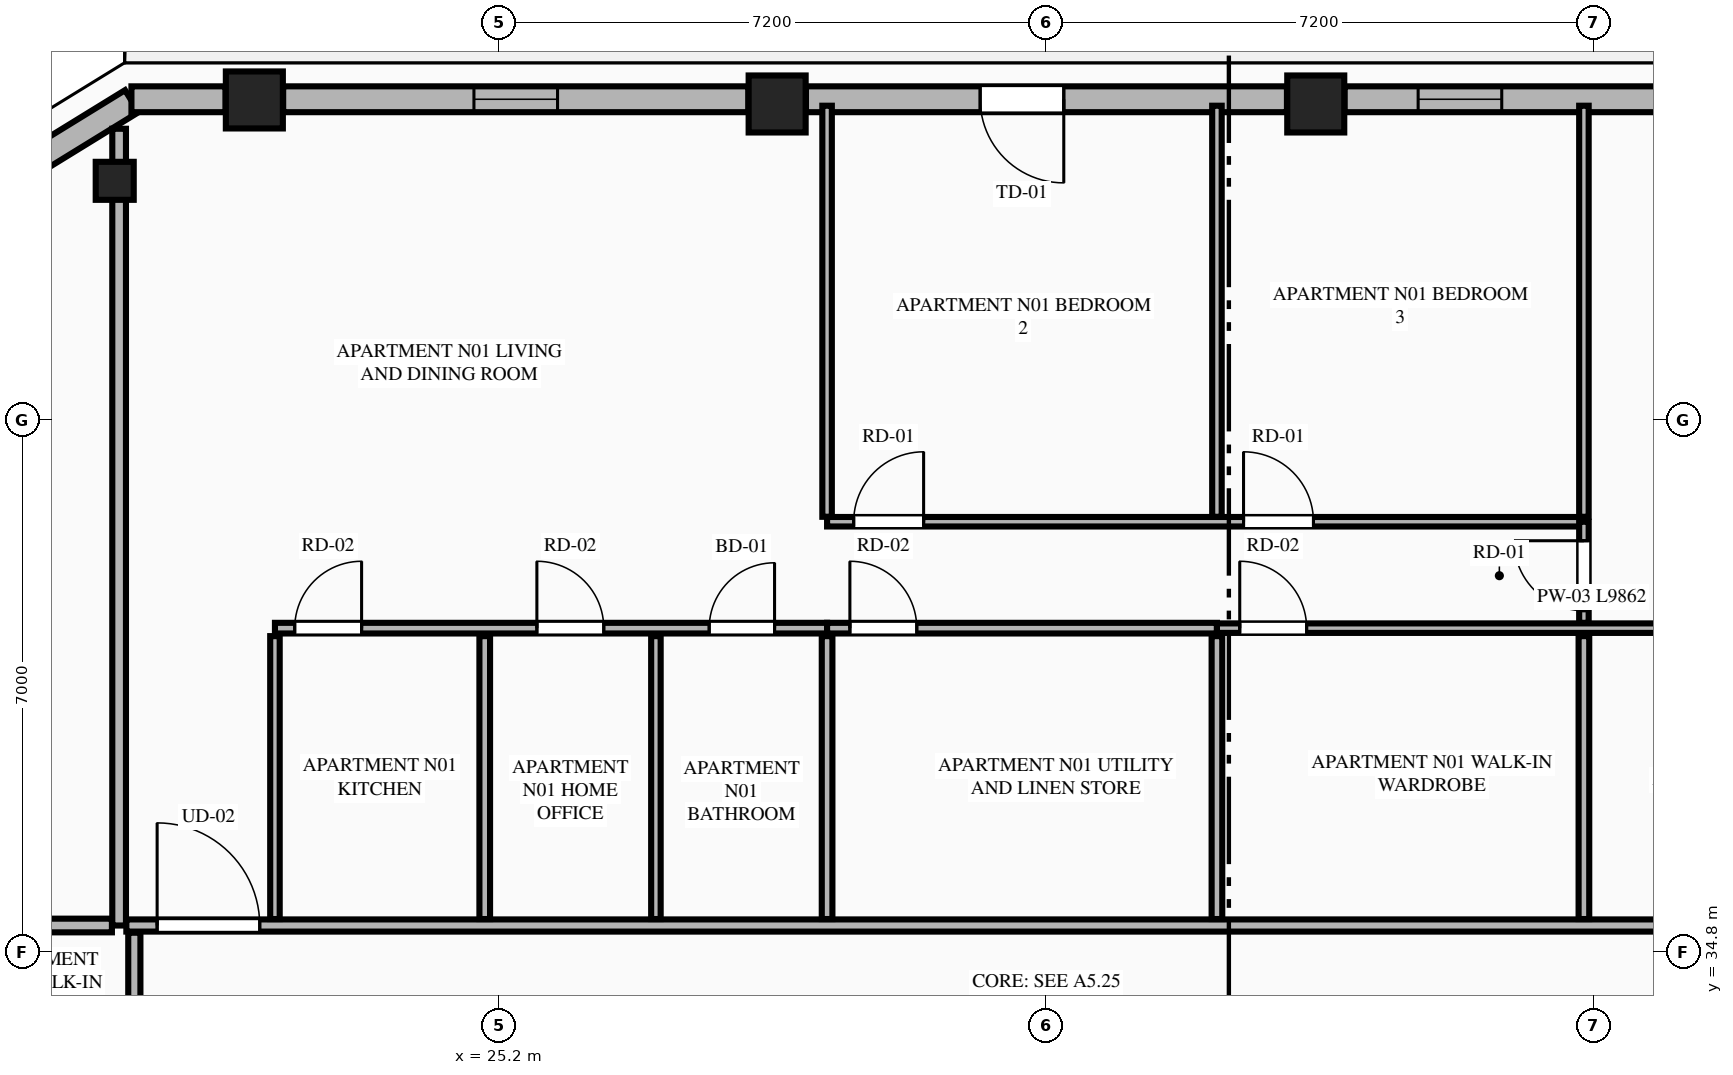
"""IFC4 building model, lengths in metres.
Left out: names, types, materials, properties, quantities, classifications, styles, units other than length and angle.
Written with IfcOpenShell. Run it as: python <this file> out.ifc"""

import sys

from ifc_helpers import new_model, si_unit, direction, frame, frame_2d, origin, origin_2d, place, context, subcontext, project, spatial, rectangle, extrude, element, fill, save


model = new_model("IFC4")
c1 = context("Model", 3, precision=1e-05, world=origin(), true_north=direction((0.0, 1.0)))
c2 = subcontext(c1, "Body", "Model", "MODEL_VIEW")
j1 = project(units=[si_unit("LENGTHUNIT", "METRE"), si_unit("PLANEANGLEUNIT", "RADIAN")], contexts=[c1])
p1 = place(None, origin())
s1 = spatial("IfcSite", under=j1, at=p1, CompositionType="ELEMENT")
p2 = place(p1, origin())
s2 = spatial("IfcBuilding", under=s1, at=p2, CompositionType="ELEMENT")
p3 = place(p2, frame((0.0, 0.0, 207.4)))
s3 = spatial("IfcBuildingStorey", under=s2, at=p3, CompositionType="ELEMENT", Elevation=207.4)
for number, where, z_axis, x_axis in (
    (1, (35.943, 45.958, 0.0), (0.0, 0.0, 1.0), (1.0, 0.0, 0.0)),
    (2, (28.857, 45.958, 0.0), (0.0, 0.0, 1.0), (1.0, 0.0, 0.0)),
    (3, (21.979, 46.011, 0.0), (0.0, 0.0, 1.0), (1.0, 0.0, 0.0)),
):
    element("IfcColumn", number, at=place(p3, frame(where, z_axis=z_axis, x_axis=x_axis)), inside=s3, PredefinedType="COLUMN", context=c2, shape_type="SweptSolid", body=[
        extrude(rectangle(XDim=0.75, YDim=0.75, at=origin_2d()), origin(), (0.0, 0.0, 1.0), 3.55),
    ])
p4 = place(p3, frame((20.142, 44.947, 0.0), z_axis=(0.0, 0.0, 1.0), x_axis=(-0.865230187018, -0.501374833306, 0.0)))
e4 = element("IfcColumn", 4, at=p4, inside=s3, PredefinedType="PILASTER", context=c2, shape_type="SweptSolid", body=[
    extrude(rectangle(XDim=0.5, YDim=0.35, at=origin_2d()), origin(), (0.0, 0.0, 1.0), 3.55),
])
p5 = place(p3, frame((20.367, 45.995, 0.0), z_axis=(0.0, 0.0, 1.0), x_axis=(-0.851713271379, -0.524008113828, 0.0)))
e5 = element("IfcWall", 5, at=p5, inside=s3, PredefinedType="STANDARD", context=c2, shape_type="SweptSolid", body=[
    extrude(rectangle(XDim=1.678, YDim=0.34, at=frame_2d((0.839, 0.0))), origin(), (0.0, 0.0, 1.0), 3.35),
])
p6 = place(p3, frame((42.442, 46.02, 0.0), z_axis=(0.0, 0.0, 1.0), x_axis=(-1.0, 0.0, 0.0)))
e6 = element("IfcWall", 6, at=p6, inside=s3, PredefinedType="STANDARD", context=c2, shape_type="SweptSolid", body=[
    extrude(rectangle(XDim=6.12, YDim=0.34, at=frame_2d((3.06, 0.0))), origin(), (0.0, 0.0, 1.0), 2.883),
])
p7 = place(p6, frame((0.879, 0.0, 0.75)))
e7 = element("IfcOpeningElement", 7, at=p7, cuts=e6, PredefinedType="OPENING", context=c2, shape_type="SweptSolid", body=[
    extrude(rectangle(XDim=1.1, YDim=1.983, at=frame_2d((0.55, 0.991))), frame((0.0, 0.18, 0.0), z_axis=(0.0, -1.0, 0.0), x_axis=(1.0, 0.0, 0.0)), (0.0, 0.0, 1.0), 0.36),
])
p8 = place(p6, frame((4.052, 0.0, 0.75)))
e8 = element("IfcOpeningElement", 8, at=p8, cuts=e6, PredefinedType="OPENING", context=c2, shape_type="SweptSolid", body=[
    extrude(rectangle(XDim=1.1, YDim=1.983, at=frame_2d((0.55, 0.991))), frame((0.0, 0.18, 0.0), z_axis=(0.0, -1.0, 0.0), x_axis=(1.0, 0.0, 0.0)), (0.0, 0.0, 1.0), 0.36),
])
p9 = place(p3, frame((35.564, 46.02, 0.0), z_axis=(0.0, 0.0, 1.0), x_axis=(-1.0, 0.0, 0.0)))
e9 = element("IfcWall", 9, at=p9, inside=s3, PredefinedType="STANDARD", context=c2, shape_type="SweptSolid", body=[
    extrude(rectangle(XDim=6.328, YDim=0.34, at=frame_2d((3.164, 0.0))), origin(), (0.0, 0.0, 1.0), 2.883),
])
p10 = place(p9, frame((2.936, 0.0, 0.0)))
e10 = element("IfcOpeningElement", 10, at=p10, cuts=e9, PredefinedType="OPENING", context=c2, shape_type="SweptSolid", body=[
    extrude(rectangle(XDim=1.1, YDim=2.25, at=frame_2d((0.55, 1.125))), frame((0.0, 0.18, 0.0), z_axis=(0.0, -1.0, 0.0), x_axis=(1.0, 0.0, 0.0)), (0.0, 0.0, 1.0), 0.36),
])
p11 = place(p3, frame((28.478, 46.02, 0.0), z_axis=(0.0, 0.0, 1.0), x_axis=(-1.0, 0.0, 0.0)))
e11 = element("IfcWall", 11, at=p11, inside=s3, PredefinedType="STANDARD", context=c2, shape_type="SweptSolid", body=[
    extrude(rectangle(XDim=6.12, YDim=0.34, at=frame_2d((3.06, 0.0))), origin(), (0.0, 0.0, 1.0), 2.883),
])
p12 = place(p11, frame((2.51, 0.0, 0.75)))
e12 = element("IfcOpeningElement", 12, at=p12, cuts=e11, PredefinedType="OPENING", context=c2, shape_type="SweptSolid", body=[
    extrude(rectangle(XDim=1.1, YDim=1.983, at=frame_2d((0.55, 0.991))), frame((0.0, 0.18, 0.0), z_axis=(0.0, -1.0, 0.0), x_axis=(1.0, 0.0, 0.0)), (0.0, 0.0, 1.0), 0.36),
])
p13 = place(p3, frame((21.6, 46.02, 0.0), z_axis=(0.0, 0.0, 1.0), x_axis=(-1.0, 0.0, 0.0)))
e13 = element("IfcWall", 13, at=p13, inside=s3, PredefinedType="STANDARD", context=c2, shape_type="SweptSolid", body=[
    extrude(rectangle(XDim=1.238, YDim=0.34, at=frame_2d((0.619, 0.0))), origin(), (0.0, 0.0, 1.0), 3.35),
])
p14 = place(p3, frame((20.2, 35.15, 0.0), z_axis=(0.0, 0.0, 1.0), x_axis=(0.0, 1.0, 0.0)))
e14 = element("IfcWall", 14, at=p14, inside=s3, PredefinedType="PARTITIONING", context=c2, shape_type="SweptSolid", body=[
    extrude(rectangle(XDim=10.482, YDim=0.18, at=frame_2d((5.241, 0.0))), origin(), (0.0, 0.0, 1.0), 3.35),
])
p15 = place(p3, frame((20.295, 35.15, 0.0), z_axis=(0.0, 0.0, 1.0), x_axis=(1.0, 0.0, 0.0)))
e15 = element("IfcWall", 15, at=p15, inside=s3, PredefinedType="PARTITIONING", context=c2, shape_type="SweptSolid", body=[
    extrude(rectangle(XDim=24.21, YDim=0.16, at=frame_2d((12.105, 0.0))), origin(), (0.0, 0.0, 1.0), 3.35),
])
p16 = place(p15, frame((0.405, 0.0, 0.0)))
e16 = element("IfcOpeningElement", 16, at=p16, cuts=e15, PredefinedType="OPENING", context=c2, shape_type="SweptSolid", body=[
    extrude(rectangle(XDim=1.35, YDim=2.35, at=frame_2d((0.675, 1.175))), frame((0.0, 0.09, 0.0), z_axis=(0.0, -1.0, 0.0), x_axis=(1.0, 0.0, 0.0)), (0.0, 0.0, 1.0), 0.18),
])
p17 = place(p3, frame((22.25, 35.235, 0.0), z_axis=(0.0, 0.0, 1.0), x_axis=(0.0, 1.0, 0.0)))
e17 = element("IfcWall", 17, at=p17, inside=s3, PredefinedType="PARTITIONING", context=c2, shape_type="SweptSolid", body=[
    extrude(rectangle(XDim=3.722, YDim=0.125, at=frame_2d((1.861, 0.0))), origin(), (0.0, 0.0, 1.0), 2.807),
])
p18 = place(p3, frame((22.25, 39.062, 0.0), z_axis=(0.0, 0.0, 1.0), x_axis=(1.0, 0.0, 0.0)))
e18 = element("IfcWall", 18, at=p18, inside=s3, PredefinedType="PLUMBINGWALL", context=c2, shape_type="SweptSolid", body=[
    extrude(rectangle(XDim=7.264, YDim=0.14, at=frame_2d((3.632, 0.0))), origin(), (0.0, 0.0, 1.0), 3.35),
])
p19 = place(p18, frame((5.713, 0.0, 0.0)))
e19 = element("IfcOpeningElement", 19, at=p19, cuts=e18, PredefinedType="OPENING", context=c2, shape_type="SweptSolid", body=[
    extrude(rectangle(XDim=0.86, YDim=2.1, at=frame_2d((0.43, 1.05))), frame((0.0, 0.08, 0.0), z_axis=(0.0, -1.0, 0.0), x_axis=(1.0, 0.0, 0.0)), (0.0, 0.0, 1.0), 0.16),
])
p20 = place(p18, frame((0.26, 0.0, 0.0)))
e20 = element("IfcOpeningElement", 20, at=p20, cuts=e18, PredefinedType="OPENING", context=c2, shape_type="SweptSolid", body=[
    extrude(rectangle(XDim=0.88, YDim=2.15, at=frame_2d((0.44, 1.075))), frame((0.0, 0.08, 0.0), z_axis=(0.0, -1.0, 0.0), x_axis=(1.0, 0.0, 0.0)), (0.0, 0.0, 1.0), 0.16),
])
p21 = place(p18, frame((3.446, 0.0, 0.0)))
e21 = element("IfcOpeningElement", 21, at=p21, cuts=e18, PredefinedType="OPENING", context=c2, shape_type="SweptSolid", body=[
    extrude(rectangle(XDim=0.88, YDim=2.15, at=frame_2d((0.44, 1.075))), frame((0.0, 0.08, 0.0), z_axis=(0.0, -1.0, 0.0), x_axis=(1.0, 0.0, 0.0)), (0.0, 0.0, 1.0), 0.16),
])
p22 = place(p3, frame((29.514, 39.062, 0.0), z_axis=(0.0, 0.0, 1.0), x_axis=(1.0, 0.0, 0.0)))
e22 = element("IfcWall", 22, at=p22, inside=s3, PredefinedType="PLUMBINGWALL", context=c2, shape_type="SweptSolid", body=[
    extrude(rectangle(XDim=5.129, YDim=0.14, at=frame_2d((2.564, 0.0))), origin(), (0.0, 0.0, 1.0), 3.35),
])
p23 = place(p22, frame((0.3, 0.0, 0.0)))
e23 = element("IfcOpeningElement", 23, at=p23, cuts=e22, PredefinedType="OPENING", context=c2, shape_type="SweptSolid", body=[
    extrude(rectangle(XDim=0.88, YDim=2.15, at=frame_2d((0.44, 1.075))), frame((0.0, 0.08, 0.0), z_axis=(0.0, -1.0, 0.0), x_axis=(1.0, 0.0, 0.0)), (0.0, 0.0, 1.0), 0.16),
])
p24 = place(p3, frame((34.643, 39.062, 0.0), z_axis=(0.0, 0.0, 1.0), x_axis=(1.0, 0.0, 0.0)))
e24 = element("IfcWall", 24, at=p24, inside=s3, PredefinedType="PARTITIONING", context=c2, shape_type="SweptSolid", body=[
    extrude(rectangle(XDim=9.862, YDim=0.125, at=frame_2d((4.931, 0.0))), origin(), (0.0, 0.0, 1.0), 3.35),
])
p25 = place(p24, frame((6.92, 0.0, 0.0)))
e25 = element("IfcOpeningElement", 25, at=p25, cuts=e24, PredefinedType="OPENING", context=c2, shape_type="SweptSolid", body=[
    extrude(rectangle(XDim=0.86, YDim=2.1, at=frame_2d((0.43, 1.05))), frame((0.0, 0.073, 0.0), z_axis=(0.0, -1.0, 0.0), x_axis=(1.0, 0.0, 0.0)), (0.0, 0.0, 1.0), 0.145),
])
p26 = place(p24, frame((0.3, 0.0, 0.0)))
e26 = element("IfcOpeningElement", 26, at=p26, cuts=e24, PredefinedType="OPENING", context=c2, shape_type="SweptSolid", body=[
    extrude(rectangle(XDim=0.88, YDim=2.15, at=frame_2d((0.44, 1.075))), frame((0.0, 0.073, 0.0), z_axis=(0.0, -1.0, 0.0), x_axis=(1.0, 0.0, 0.0)), (0.0, 0.0, 1.0), 0.145),
])
p27 = place(p3, frame((25.01, 35.235, 0.0), z_axis=(0.0, 0.0, 1.0), x_axis=(0.0, 1.0, 0.0)))
e27 = element("IfcWall", 27, at=p27, inside=s3, PredefinedType="PLUMBINGWALL", context=c2, shape_type="SweptSolid", body=[
    extrude(rectangle(XDim=3.722, YDim=0.14, at=frame_2d((1.861, 0.0))), origin(), (0.0, 0.0, 1.0), 3.35),
])
p28 = place(p3, frame((27.262, 35.235, 0.0), z_axis=(0.0, 0.0, 1.0), x_axis=(0.0, 1.0, 0.0)))
e28 = element("IfcWall", 28, at=p28, inside=s3, PredefinedType="PARTITIONING", context=c2, shape_type="SweptSolid", body=[
    extrude(rectangle(XDim=3.722, YDim=0.125, at=frame_2d((1.861, 0.0))), origin(), (0.0, 0.0, 1.0), 3.35),
])
p29 = place(p3, frame((29.514, 40.527, 0.0), z_axis=(0.0, 0.0, 1.0), x_axis=(0.0, 1.0, 0.0)))
e29 = element("IfcWall", 29, at=p29, inside=s3, PredefinedType="PARTITIONING", context=c2, shape_type="SweptSolid", body=[
    extrude(rectangle(XDim=5.408, YDim=0.125, at=frame_2d((2.704, 0.0))), origin(), (0.0, 0.0, 1.0), 3.35),
])
p30 = place(p3, frame((29.514, 40.462, 0.0), z_axis=(0.0, 0.0, 1.0), x_axis=(1.0, 0.0, 0.0)))
e30 = element("IfcWall", 30, at=p30, inside=s3, PredefinedType="PARTITIONING", context=c2, shape_type="SweptSolid", body=[
    extrude(rectangle(XDim=9.957, YDim=0.125, at=frame_2d((4.979, 0.0))), origin(), (0.0, 0.0, 1.0), 3.35),
])
p31 = place(p30, frame((0.35, 0.0, 0.0)))
e31 = element("IfcOpeningElement", 31, at=p31, cuts=e30, PredefinedType="OPENING", context=c2, shape_type="SweptSolid", body=[
    extrude(rectangle(XDim=0.92, YDim=2.15, at=frame_2d((0.46, 1.075))), frame((0.0, 0.073, 0.0), z_axis=(0.0, -1.0, 0.0), x_axis=(1.0, 0.0, 0.0)), (0.0, 0.0, 1.0), 0.145),
])
p32 = place(p30, frame((5.479, 0.0, 0.0)))
e32 = element("IfcOpeningElement", 32, at=p32, cuts=e30, PredefinedType="OPENING", context=c2, shape_type="SweptSolid", body=[
    extrude(rectangle(XDim=0.92, YDim=2.15, at=frame_2d((0.46, 1.075))), frame((0.0, 0.073, 0.0), z_axis=(0.0, -1.0, 0.0), x_axis=(1.0, 0.0, 0.0)), (0.0, 0.0, 1.0), 0.145),
])
p33 = place(p3, frame((39.471, 39.132, 0.0), z_axis=(0.0, 0.0, 1.0), x_axis=(0.0, 1.0, 0.0)))
e33 = element("IfcWall", 33, at=p33, inside=s3, PredefinedType="PARTITIONING", context=c2, shape_type="SweptSolid", body=[
    extrude(rectangle(XDim=1.33, YDim=0.125, at=frame_2d((0.665, 0.0))), origin(), (0.0, 0.0, 1.0), 3.35),
])
p34 = place(p33, frame((0.16, 0.0, 0.0)))
e34 = element("IfcOpeningElement", 34, at=p34, cuts=e33, PredefinedType="OPENING", context=c2, shape_type="SweptSolid", body=[
    extrude(rectangle(XDim=0.92, YDim=2.15, at=frame_2d((0.46, 1.075))), frame((0.0, 0.073, 0.0), z_axis=(0.0, -1.0, 0.0), x_axis=(1.0, 0.0, 0.0)), (0.0, 0.0, 1.0), 0.145),
])
for number, where, z_axis, x_axis in (
    (35, (29.514, 35.235, 0.0), (0.0, 0.0, 1.0), (0.0, 1.0, 0.0)),
    (36, (34.643, 35.235, 0.0), (0.0, 0.0, 1.0), (0.0, 1.0, 0.0)),
):
    element("IfcWall", number, at=place(p3, frame(where, z_axis=z_axis, x_axis=x_axis)), inside=s3, PredefinedType="PLUMBINGWALL", context=c2, shape_type="SweptSolid", body=[
        extrude(rectangle(XDim=3.722, YDim=0.14, at=frame_2d((1.861, 0.0))), origin(), (0.0, 0.0, 1.0), 3.35),
    ])
for number, where, z_axis, x_axis in (
    (37, (34.643, 40.527, 0.0), (0.0, 0.0, 1.0), (0.0, 1.0, 0.0)),
    (38, (39.471, 40.527, 0.0), (0.0, 0.0, 1.0), (0.0, 1.0, 0.0)),
):
    element("IfcWall", number, at=place(p3, frame(where, z_axis=z_axis, x_axis=x_axis)), inside=s3, PredefinedType="PARTITIONING", context=c2, shape_type="SweptSolid", body=[
        extrude(rectangle(XDim=5.408, YDim=0.125, at=frame_2d((2.704, 0.0))), origin(), (0.0, 0.0, 1.0), 3.35),
    ])
p35 = place(p3, frame((39.471, 35.235, 0.0), z_axis=(0.0, 0.0, 1.0), x_axis=(0.0, 1.0, 0.0)))
e39 = element("IfcWall", 39, at=p35, inside=s3, PredefinedType="PLUMBINGWALL", context=c2, shape_type="SweptSolid", body=[
    extrude(rectangle(XDim=3.722, YDim=0.14, at=frame_2d((1.861, 0.0))), origin(), (0.0, 0.0, 1.0), 3.35),
])
p36 = place(p3, frame((14.11, 35.15, 0.0), z_axis=(0.0, 0.0, 1.0), x_axis=(1.0, 0.0, 0.0)))
e40 = element("IfcWall", 40, at=p36, inside=s3, PredefinedType="PARTITIONING", context=c2, shape_type="SweptSolid", body=[
    extrude(rectangle(XDim=5.995, YDim=0.18, at=frame_2d((2.998, 0.0))), origin(), (0.0, 0.0, 1.0), 3.35),
])
p37 = place(p3, frame((20.4, 16.345, 0.0), z_axis=(0.0, 0.0, 1.0), x_axis=(0.0, 1.0, 0.0)))
e41 = element("IfcWall", 41, at=p37, inside=s3, PredefinedType="PARTITIONING", context=c2, shape_type="SweptSolid", body=[
    extrude(rectangle(XDim=18.71, YDim=0.16, at=frame_2d((9.355, 0.0))), origin(), (0.0, 0.0, 1.0), 3.35),
])
p38 = place(p37, frame((0.45, 0.0, 0.0)))
e42 = element("IfcOpeningElement", 42, at=p38, cuts=e41, PredefinedType="OPENING", context=c2, shape_type="SweptSolid", body=[
    extrude(rectangle(XDim=1.02, YDim=2.25, at=frame_2d((0.51, 1.125))), frame((0.0, 0.09, 0.0), z_axis=(0.0, -1.0, 0.0), x_axis=(1.0, 0.0, 0.0)), (0.0, 0.0, 1.0), 0.18),
])
p39 = place(p10, origin())
e43 = element("IfcDoor", 43, at=p39, inside=s3, OperationType="SINGLE_SWING_LEFT", PredefinedType="DOOR", context=c2, shape_type="SweptSolid", body=[
    extrude(rectangle(XDim=1.1, YDim=2.25, at=frame_2d((0.55, 1.125))), frame((0.0, 0.025, 0.0), z_axis=(0.0, -1.0, 0.0), x_axis=(1.0, 0.0, 0.0)), (0.0, 0.0, 1.0), 0.05),
])
fill(e10, e43)
p40 = place(p12, origin())
e44 = element("IfcWindow", 44, at=p40, inside=s3, PartitioningType="SINGLE_PANEL", PredefinedType="WINDOW", context=c2, shape_type="SweptSolid", body=[
    extrude(rectangle(XDim=1.1, YDim=1.983, at=frame_2d((0.55, 0.991))), frame((0.0, 0.03, 0.0), z_axis=(0.0, -1.0, 0.0), x_axis=(1.0, 0.0, 0.0)), (0.0, 0.0, 1.0), 0.06),
])
fill(e12, e44)
p41 = place(p19, origin())
e45 = element("IfcDoor", 45, at=p41, inside=s3, OperationType="SINGLE_SWING_RIGHT", PredefinedType="DOOR", context=c2, shape_type="SweptSolid", body=[
    extrude(rectangle(XDim=0.86, YDim=2.1, at=frame_2d((0.43, 1.05))), frame((0.0, 0.025, 0.0), z_axis=(0.0, -1.0, 0.0), x_axis=(1.0, 0.0, 0.0)), (0.0, 0.0, 1.0), 0.05),
])
fill(e19, e45)
p42 = place(p16, origin())
e46 = element("IfcDoor", 46, at=p42, inside=s3, OperationType="SINGLE_SWING_LEFT", PredefinedType="DOOR", context=c2, shape_type="SweptSolid", body=[
    extrude(rectangle(XDim=1.35, YDim=2.35, at=frame_2d((0.675, 1.175))), frame((0.0, 0.025, 0.0), z_axis=(0.0, -1.0, 0.0), x_axis=(1.0, 0.0, 0.0)), (0.0, 0.0, 1.0), 0.05),
])
fill(e16, e46)
p43 = place(p20, origin())
e47 = element("IfcDoor", 47, at=p43, inside=s3, OperationType="SINGLE_SWING_RIGHT", PredefinedType="DOOR", context=c2, shape_type="SweptSolid", body=[
    extrude(rectangle(XDim=0.88, YDim=2.15, at=frame_2d((0.44, 1.075))), frame((0.0, 0.025, 0.0), z_axis=(0.0, -1.0, 0.0), x_axis=(1.0, 0.0, 0.0)), (0.0, 0.0, 1.0), 0.05),
])
fill(e20, e47)
p44 = place(p21, origin())
e48 = element("IfcDoor", 48, at=p44, inside=s3, OperationType="SINGLE_SWING_LEFT", PredefinedType="DOOR", context=c2, shape_type="SweptSolid", body=[
    extrude(rectangle(XDim=0.88, YDim=2.15, at=frame_2d((0.44, 1.075))), frame((0.0, 0.025, 0.0), z_axis=(0.0, -1.0, 0.0), x_axis=(1.0, 0.0, 0.0)), (0.0, 0.0, 1.0), 0.05),
])
fill(e21, e48)
p45 = place(p23, origin())
e49 = element("IfcDoor", 49, at=p45, inside=s3, OperationType="SINGLE_SWING_LEFT", PredefinedType="DOOR", context=c2, shape_type="SweptSolid", body=[
    extrude(rectangle(XDim=0.88, YDim=2.15, at=frame_2d((0.44, 1.075))), frame((0.0, 0.025, 0.0), z_axis=(0.0, -1.0, 0.0), x_axis=(1.0, 0.0, 0.0)), (0.0, 0.0, 1.0), 0.05),
])
fill(e23, e49)
p46 = place(p31, origin())
e50 = element("IfcDoor", 50, at=p46, inside=s3, OperationType="SINGLE_SWING_RIGHT", PredefinedType="DOOR", context=c2, shape_type="SweptSolid", body=[
    extrude(rectangle(XDim=0.92, YDim=2.15, at=frame_2d((0.46, 1.075))), frame((0.0, 0.025, 0.0), z_axis=(0.0, -1.0, 0.0), x_axis=(1.0, 0.0, 0.0)), (0.0, 0.0, 1.0), 0.05),
])
fill(e31, e50)
p47 = place(p32, origin())
e51 = element("IfcDoor", 51, at=p47, inside=s3, OperationType="SINGLE_SWING_LEFT", PredefinedType="DOOR", context=c2, shape_type="SweptSolid", body=[
    extrude(rectangle(XDim=0.92, YDim=2.15, at=frame_2d((0.46, 1.075))), frame((0.0, 0.025, 0.0), z_axis=(0.0, -1.0, 0.0), x_axis=(1.0, 0.0, 0.0)), (0.0, 0.0, 1.0), 0.05),
])
fill(e32, e51)
p48 = place(p34, origin())
e52 = element("IfcDoor", 52, at=p48, inside=s3, OperationType="SINGLE_SWING_RIGHT", PredefinedType="DOOR", context=c2, shape_type="SweptSolid", body=[
    extrude(rectangle(XDim=0.92, YDim=2.15, at=frame_2d((0.46, 1.075))), frame((0.0, 0.025, 0.0), z_axis=(0.0, -1.0, 0.0), x_axis=(1.0, 0.0, 0.0)), (0.0, 0.0, 1.0), 0.05),
])
fill(e34, e52)
p49 = place(p26, origin())
e53 = element("IfcDoor", 53, at=p49, inside=s3, OperationType="SINGLE_SWING_LEFT", PredefinedType="DOOR", context=c2, shape_type="SweptSolid", body=[
    extrude(rectangle(XDim=0.88, YDim=2.15, at=frame_2d((0.44, 1.075))), frame((0.0, 0.025, 0.0), z_axis=(0.0, -1.0, 0.0), x_axis=(1.0, 0.0, 0.0)), (0.0, 0.0, 1.0), 0.05),
])
fill(e26, e53)
p50 = place(p8, origin())
e54 = element("IfcWindow", 54, at=p50, inside=s3, PartitioningType="SINGLE_PANEL", PredefinedType="WINDOW", context=c2, shape_type="SweptSolid", body=[
    extrude(rectangle(XDim=1.1, YDim=1.983, at=frame_2d((0.55, 0.991))), frame((0.0, 0.03, 0.0), z_axis=(0.0, -1.0, 0.0), x_axis=(1.0, 0.0, 0.0)), (0.0, 0.0, 1.0), 0.06),
])
fill(e8, e54)
save(model, sys.argv[1])
